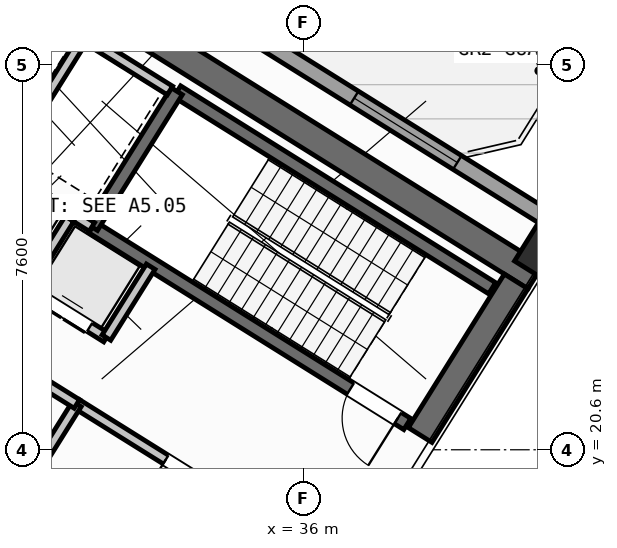
"""IFC4 building model, lengths in metres.
Left out: names, types, materials, properties, quantities, classifications, styles, units other than length and angle.
Written with IfcOpenShell. Run it as: python <this file> out.ifc"""

import sys

from ifc_helpers import new_model, si_unit, direction, frame, frame_2d, origin, origin_2d, place, context, subcontext, project, spatial, rectangle, hollow_rectangle, extrude, source, transform, mapped, element, fill, save


model = new_model("IFC4")
c1 = context("Model", 3, precision=1e-05, world=origin(), true_north=direction((0.0, 1.0)))
c2 = subcontext(c1, "Body", "Model", "MODEL_VIEW")
j1 = project(units=[si_unit("LENGTHUNIT", "METRE"), si_unit("PLANEANGLEUNIT", "RADIAN")], contexts=[c1])
p1 = place(None, origin())
s1 = spatial("IfcSite", under=j1, at=p1, CompositionType="ELEMENT")
p2 = place(p1, origin())
s2 = spatial("IfcBuilding", under=s1, at=p2, CompositionType="ELEMENT")
p3 = place(p2, frame((0.0, 0.0, 127.8)))
s3 = spatial("IfcBuildingStorey", under=s2, at=p3, CompositionType="ELEMENT", Elevation=127.8)
p4 = place(p3, frame((40.573, 24.01, 0.0), z_axis=(0.0, 0.0, 1.0), x_axis=(-0.848047359947, 0.529920442413, 0.0)))
e1 = element("IfcWall", 1, at=p4, inside=s3, PredefinedType="SHEAR", context=c2, shape_type="SweptSolid", body=[
    extrude(rectangle(XDim=13.14, YDim=0.55, at=frame_2d((6.57, 0.0))), origin(), (0.0, 0.0, 1.0), 4.55),
])
p5 = place(p3, frame((40.194, 23.922, 0.0), z_axis=(0.0, 0.0, 1.0), x_axis=(-0.529888438328, -0.848067357541, 0.0)))
e2 = element("IfcWall", 2, at=p5, inside=s3, PredefinedType="SHEAR", context=c2, shape_type="SweptSolid", body=[
    extrude(rectangle(XDim=3.575, YDim=0.55, at=frame_2d((1.788, 0.0))), origin(), (0.0, 0.0, 1.0), 4.55),
])
m1 = source(origin(), c2, "Body", "SweptSolid", [
    extrude(hollow_rectangle(XDim=0.9, YDim=0.9, WallThickness=0.036, at=origin_2d()), origin(), (0.0, 0.0, 1.0), 4.8),
])
p6 = place(p3, frame((40.783, 24.469, 0.0), z_axis=(0.0, 0.0, 1.0), x_axis=(-0.848048096156, 0.529919264233, 0.0)))
e3 = element("IfcColumn", 3, at=p6, inside=s3, PredefinedType="COLUMN", context=c2, shape_type="MappedRepresentation", body=[
    mapped(m1, transform((0.0, 0.0, 0.0), scale=1.0)),
])
p7 = place(p3, frame((14.138, 41.825, 0.0), z_axis=(0.0, 0.0, 1.0), x_axis=(0.848046498049, -0.529921821731, 0.0)))
e4 = element("IfcWall", 4, at=p7, inside=s3, PredefinedType="STANDARD", context=c2, shape_type="SweptSolid", body=[
    extrude(rectangle(XDim=31.588, YDim=0.32, at=frame_2d((15.794, 0.0))), origin(), (0.0, 0.0, 1.0), 4.55),
])
p8 = place(p7, frame((9.69, 0.0, 0.0)))
e5 = element("IfcOpeningElement", 5, at=p8, cuts=e4, PredefinedType="OPENING", context=c2, shape_type="SweptSolid", body=[
    extrude(rectangle(XDim=1.05, YDim=2.15, at=frame_2d((0.525, 1.075))), frame((0.0, 0.17, 0.0), z_axis=(0.0, -1.0, 0.0), x_axis=(1.0, 0.0, 0.0)), (0.0, 0.0, 1.0), 0.34),
])
p9 = place(p7, frame((14.666, 0.0, 0.0)))
e6 = element("IfcOpeningElement", 6, at=p9, cuts=e4, PredefinedType="OPENING", context=c2, shape_type="SweptSolid", body=[
    extrude(rectangle(XDim=1.5, YDim=2.25, at=frame_2d((0.75, 1.125))), frame((0.0, 0.17, 0.0), z_axis=(0.0, -1.0, 0.0), x_axis=(1.0, 0.0, 0.0)), (0.0, 0.0, 1.0), 0.34),
])
p10 = place(p7, frame((0.791, 0.0, 0.85)))
e7 = element("IfcOpeningElement", 7, at=p10, cuts=e4, PredefinedType="OPENING", context=c2, shape_type="SweptSolid", body=[
    extrude(rectangle(XDim=1.8, YDim=1.5, at=frame_2d((0.9, 0.75))), frame((0.0, 0.17, 0.0), z_axis=(0.0, -1.0, 0.0), x_axis=(1.0, 0.0, 0.0)), (0.0, 0.0, 1.0), 0.34),
])
p11 = place(p7, frame((3.996, 0.0, 0.95)))
e8 = element("IfcOpeningElement", 8, at=p11, cuts=e4, PredefinedType="OPENING", context=c2, shape_type="SweptSolid", body=[
    extrude(rectangle(XDim=1.2, YDim=1.4, at=frame_2d((0.6, 0.7))), frame((0.0, 0.17, 0.0), z_axis=(0.0, -1.0, 0.0), x_axis=(1.0, 0.0, 0.0)), (0.0, 0.0, 1.0), 0.34),
])
p12 = place(p7, frame((7.582, 0.0, 0.95)))
e9 = element("IfcOpeningElement", 9, at=p12, cuts=e4, PredefinedType="OPENING", context=c2, shape_type="SweptSolid", body=[
    extrude(rectangle(XDim=1.2, YDim=1.4, at=frame_2d((0.6, 0.7))), frame((0.0, 0.17, 0.0), z_axis=(0.0, -1.0, 0.0), x_axis=(1.0, 0.0, 0.0)), (0.0, 0.0, 1.0), 0.34),
])
p13 = place(p7, frame((21.381, 0.0, 0.75)))
e10 = element("IfcOpeningElement", 10, at=p13, cuts=e4, PredefinedType="OPENING", context=c2, shape_type="SweptSolid", body=[
    extrude(rectangle(XDim=2.4, YDim=1.6, at=frame_2d((1.2, 0.8))), frame((0.0, 0.17, 0.0), z_axis=(0.0, -1.0, 0.0), x_axis=(1.0, 0.0, 0.0)), (0.0, 0.0, 1.0), 0.34),
])
p14 = place(p7, frame((26.956, 0.0, 0.75)))
e11 = element("IfcOpeningElement", 11, at=p14, cuts=e4, PredefinedType="OPENING", context=c2, shape_type="SweptSolid", body=[
    extrude(rectangle(XDim=2.4, YDim=1.6, at=frame_2d((1.2, 0.8))), frame((0.0, 0.17, 0.0), z_axis=(0.0, -1.0, 0.0), x_axis=(1.0, 0.0, 0.0)), (0.0, 0.0, 1.0), 0.34),
])
p15 = place(p3, frame((31.28, 18.261, 0.0), z_axis=(0.0, 0.0, 1.0), x_axis=(-0.848051618787, 0.529913626805, 0.0)))
e12 = element("IfcWall", 12, at=p15, inside=s3, PredefinedType="SHEAR", context=c2, shape_type="SweptSolid", body=[
    extrude(rectangle(XDim=7.46, YDim=0.26, at=frame_2d((3.73, 0.0))), origin(), (0.0, 0.0, 1.0), 4.55),
])
p16 = place(p15, frame((0.36, 0.0, 0.0)))
e13 = element("IfcOpeningElement", 13, at=p16, cuts=e12, PredefinedType="OPENING", context=c2, shape_type="SweptSolid", body=[
    extrude(rectangle(XDim=0.86, YDim=2.05, at=frame_2d((0.43, 1.025))), frame((0.0, 0.14, 0.0), z_axis=(0.0, -1.0, 0.0), x_axis=(1.0, 0.0, 0.0)), (0.0, 0.0, 1.0), 0.28),
])
p17 = place(p3, frame((39.721, 23.788, 0.0), z_axis=(0.0, 0.0, 1.0), x_axis=(-0.848054434086, 0.529909121291, 0.0)))
e14 = element("IfcWall", 14, at=p17, inside=s3, PredefinedType="SHEAR", context=c2, shape_type="SweptSolid", body=[
    extrude(rectangle(XDim=7.33, YDim=0.26, at=frame_2d((3.665, 0.0))), origin(), (0.0, 0.0, 1.0), 4.55),
])
p18 = place(p3, frame((38.046, 21.108, 0.0), z_axis=(0.0, 0.0, 1.0), x_axis=(-0.848054434086, 0.529909121291, 0.0)))
e15 = element("IfcWall", 15, at=p18, inside=s3, PredefinedType="SHEAR", context=c2, shape_type="SweptSolid", body=[
    extrude(rectangle(XDim=7.33, YDim=0.26, at=frame_2d((3.665, 0.0))), origin(), (0.0, 0.0, 1.0), 4.55),
])
p19 = place(p18, frame((0.22, 0.0, 0.0)))
e16 = element("IfcOpeningElement", 16, at=p19, cuts=e15, PredefinedType="OPENING", context=c2, shape_type="SweptSolid", body=[
    extrude(rectangle(XDim=1.1, YDim=2.1, at=frame_2d((0.55, 1.05))), frame((0.0, 0.14, 0.0), z_axis=(0.0, -1.0, 0.0), x_axis=(1.0, 0.0, 0.0)), (0.0, 0.0, 1.0), 0.28),
])
p20 = place(p3, frame((33.496, 27.677, 0.0), z_axis=(0.0, 0.0, 1.0), x_axis=(-0.529908658664, -0.84805472316, 0.0)))
e17 = element("IfcWall", 17, at=p20, inside=s3, PredefinedType="SHEAR", context=c2, shape_type="SweptSolid", body=[
    extrude(rectangle(XDim=3.16, YDim=0.26, at=frame_2d((1.58, 0.0))), origin(), (0.0, 0.0, 1.0), 4.55),
])
p21 = place(p3, frame((36.417, 18.447, 0.0), z_axis=(0.0, 0.0, 1.0), x_axis=(-0.848064879198, 0.529892404805, 0.0)))
e18 = element("IfcWall", 18, at=p21, inside=s3, PredefinedType="STANDARD", context=c2, shape_type="SweptSolid", body=[
    extrude(rectangle(XDim=5.768, YDim=0.2, at=frame_2d((2.884, 0.0))), origin(), (0.0, 0.0, 1.0), 4.54),
])
p22 = place(p21, frame((2.548, 0.0, 0.0)))
e19 = element("IfcOpeningElement", 19, at=p22, cuts=e18, PredefinedType="OPENING", context=c2, shape_type="SweptSolid", body=[
    extrude(rectangle(XDim=1.15, YDim=2.1, at=frame_2d((0.575, 1.05))), frame((0.0, 0.11, 0.0), z_axis=(0.0, -1.0, 0.0), x_axis=(1.0, 0.0, 0.0)), (0.0, 0.0, 1.0), 0.22),
])
p23 = place(p3, frame((31.822, 24.998, 0.0), z_axis=(0.0, 0.0, 1.0), x_axis=(-0.848036912365, 0.52993716162, 0.0)))
e20 = element("IfcWall", 20, at=p23, inside=s3, PredefinedType="STANDARD", context=c2, shape_type="SweptSolid", body=[
    extrude(rectangle(XDim=4.618, YDim=0.2, at=frame_2d((2.309, 0.0))), origin(), (0.0, 0.0, 1.0), 4.54),
])
p24 = place(p3, frame((32.108, 22.814, 0.0), z_axis=(0.0, 0.0, 1.0), x_axis=(-0.848042229521, 0.529928652696, 0.0)))
e21 = element("IfcWall", 21, at=p24, inside=s3, PredefinedType="STANDARD", context=c2, shape_type="SweptSolid", body=[
    extrude(rectangle(XDim=5.62, YDim=0.2, at=frame_2d((2.81, 0.0))), origin(), (0.0, 0.0, 1.0), 4.54),
])
p25 = place(p24, frame((0.39, 0.0, 0.0)))
e22 = element("IfcOpeningElement", 22, at=p25, cuts=e21, PredefinedType="OPENING", context=c2, shape_type="SweptSolid", body=[
    extrude(rectangle(XDim=1.1, YDim=2.15, at=frame_2d((0.55, 1.075))), frame((0.0, 0.11, 0.0), z_axis=(0.0, -1.0, 0.0), x_axis=(1.0, 0.0, 0.0)), (0.0, 0.0, 1.0), 0.22),
])
p26 = place(p24, frame((2.25, 0.0, 0.0)))
e23 = element("IfcOpeningElement", 23, at=p26, cuts=e21, PredefinedType="OPENING", context=c2, shape_type="SweptSolid", body=[
    extrude(rectangle(XDim=1.1, YDim=2.15, at=frame_2d((0.55, 1.075))), frame((0.0, 0.11, 0.0), z_axis=(0.0, -1.0, 0.0), x_axis=(1.0, 0.0, 0.0)), (0.0, 0.0, 1.0), 0.22),
])
p27 = place(p24, frame((4.11, 0.0, 0.0)))
e24 = element("IfcOpeningElement", 24, at=p27, cuts=e21, PredefinedType="OPENING", context=c2, shape_type="SweptSolid", body=[
    extrude(rectangle(XDim=1.1, YDim=2.15, at=frame_2d((0.55, 1.075))), frame((0.0, 0.11, 0.0), z_axis=(0.0, -1.0, 0.0), x_axis=(1.0, 0.0, 0.0)), (0.0, 0.0, 1.0), 0.22),
])
p28 = place(p3, frame((32.982, 24.213, 0.0), z_axis=(0.0, 0.0, 1.0), x_axis=(-0.529839334948, -0.84809803628, 0.0)))
e25 = element("IfcWall", 25, at=p28, inside=s3, PredefinedType="STANDARD", context=c2, shape_type="SweptSolid", body=[
    extrude(rectangle(XDim=1.65, YDim=0.2, at=frame_2d((0.825, 0.0))), origin(), (0.0, 0.0, 1.0), 4.54),
])
p29 = place(p3, frame((31.645, 28.716, 0.0), z_axis=(0.0, 0.0, 1.0), x_axis=(-0.52986693015, -0.848080795876, 0.0)))
e26 = element("IfcWall", 26, at=p29, inside=s3, PredefinedType="STANDARD", context=c2, shape_type="SweptSolid", body=[
    extrude(rectangle(XDim=2.66, YDim=0.2, at=frame_2d((1.33, 0.0))), origin(), (0.0, 0.0, 1.0), 4.54),
])
p30 = place(p3, frame((33.363, 27.69, 0.0), z_axis=(0.0, 0.0, 1.0), x_axis=(-0.848047090064, 0.529920874315, 0.0)))
e27 = element("IfcWall", 27, at=p30, inside=s3, PredefinedType="STANDARD", context=c2, shape_type="SweptSolid", body=[
    extrude(rectangle(XDim=4.498, YDim=0.2, at=frame_2d((2.249, 0.0))), origin(), (0.0, 0.0, 1.0), 4.54),
])
p31 = place(p3, frame((31.379, 25.156, 0.0), z_axis=(0.0, 0.0, 1.0), x_axis=(-0.529998940003, -0.847998304005, 0.0)))
e28 = element("IfcWall", 28, at=p31, inside=s3, PredefinedType="STANDARD", context=c2, shape_type="SweptSolid", body=[
    extrude(rectangle(XDim=1.58, YDim=0.2, at=frame_2d((0.79, 0.0))), origin(), (0.0, 0.0, 1.0), 4.54),
])
p32 = place(p3, frame((31.525, 21.504, 0.0), z_axis=(0.0, 0.0, 1.0), x_axis=(-0.529907497854, -0.848055448493, 0.0)))
e29 = element("IfcWall", 29, at=p32, inside=s3, PredefinedType="STANDARD", context=c2, shape_type="SweptSolid", body=[
    extrude(rectangle(XDim=2.88, YDim=0.2, at=frame_2d((1.44, 0.0))), origin(), (0.0, 0.0, 1.0), 4.54),
])
p33 = place(p3, frame((31.525, 21.504, 0.0), z_axis=(0.0, 0.0, 1.0), x_axis=(-0.848040211232, 0.529931882541, 0.0)))
e30 = element("IfcWall", 30, at=p33, inside=s3, PredefinedType="STANDARD", context=c2, shape_type="SweptSolid", body=[
    extrude(rectangle(XDim=6.218, YDim=0.2, at=frame_2d((3.109, 0.0))), origin(), (0.0, 0.0, 1.0), 4.54),
])
p34 = place(p33, frame((4.4, 0.0, 0.0)))
e31 = element("IfcOpeningElement", 31, at=p34, cuts=e30, PredefinedType="OPENING", context=c2, shape_type="SweptSolid", body=[
    extrude(rectangle(XDim=0.86, YDim=2.05, at=frame_2d((0.43, 1.025))), frame((0.0, 0.11, 0.0), z_axis=(0.0, -1.0, 0.0), x_axis=(1.0, 0.0, 0.0)), (0.0, 0.0, 1.0), 0.22),
])
p35 = place(p33, frame((1.45, 0.0, 0.0)))
e32 = element("IfcOpeningElement", 32, at=p35, cuts=e30, PredefinedType="OPENING", context=c2, shape_type="SweptSolid", body=[
    extrude(rectangle(XDim=0.86, YDim=2.05, at=frame_2d((0.43, 1.025))), frame((0.0, 0.11, 0.0), z_axis=(0.0, -1.0, 0.0), x_axis=(1.0, 0.0, 0.0)), (0.0, 0.0, 1.0), 0.22),
])
m2 = source(origin(), c2, "Body", "SweptSolid", [
    extrude(rectangle(XDim=2.4, YDim=1.6, at=frame_2d((1.2, 0.8))), frame((0.0, 0.03, 0.0), z_axis=(0.0, -1.0, 0.0), x_axis=(1.0, 0.0, 0.0)), (0.0, 0.0, 1.0), 0.06),
])
p36 = place(p14, origin())
e33 = element("IfcWindow", 33, at=p36, inside=s3, PartitioningType="SINGLE_PANEL", PredefinedType="WINDOW", context=c2, shape_type="MappedRepresentation", body=[
    mapped(m2, transform((0.0, 0.0, 0.0), scale=1.0)),
])
fill(e11, e33)
m3 = source(origin(), c2, "Body", "SweptSolid", [
    extrude(rectangle(XDim=1.1, YDim=2.1, at=frame_2d((0.55, 1.05))), frame((0.0, 0.025, 0.0), z_axis=(0.0, -1.0, 0.0), x_axis=(1.0, 0.0, 0.0)), (0.0, 0.0, 1.0), 0.05),
])
p37 = place(p19, origin())
e34 = element("IfcDoor", 34, at=p37, inside=s3, OperationType="SINGLE_SWING_LEFT", PredefinedType="DOOR", context=c2, shape_type="MappedRepresentation", body=[
    mapped(m3, transform((0.0, 0.0, 0.0), scale=1.0)),
])
fill(e16, e34)
m4 = source(origin(), c2, "Body", "SweptSolid", [
    extrude(rectangle(XDim=1.15, YDim=2.1, at=frame_2d((0.575, 1.05))), frame((0.0, 0.025, 0.0), z_axis=(0.0, -1.0, 0.0), x_axis=(1.0, 0.0, 0.0)), (0.0, 0.0, 1.0), 0.05),
])
p38 = place(p22, origin())
e35 = element("IfcDoor", 35, at=p38, inside=s3, OperationType="SINGLE_SWING_RIGHT", PredefinedType="DOOR", context=c2, shape_type="MappedRepresentation", body=[
    mapped(m4, transform((0.0, 0.0, 0.0), scale=1.0)),
])
fill(e19, e35)
m5 = source(origin(), c2, "Body", "SweptSolid", [
    extrude(rectangle(XDim=1.1, YDim=2.15, at=frame_2d((0.55, 1.075))), frame((0.0, 0.025, 0.0), z_axis=(0.0, -1.0, 0.0), x_axis=(1.0, 0.0, 0.0)), (0.0, 0.0, 1.0), 0.05),
])
p39 = place(p25, origin())
e36 = element("IfcDoor", 36, at=p39, inside=s3, OperationType="DOUBLE_DOOR_SLIDING", PredefinedType="DOOR", context=c2, shape_type="MappedRepresentation", body=[
    mapped(m5, transform((0.0, 0.0, 0.0), scale=1.0)),
])
fill(e22, e36)
save(model, sys.argv[1])
